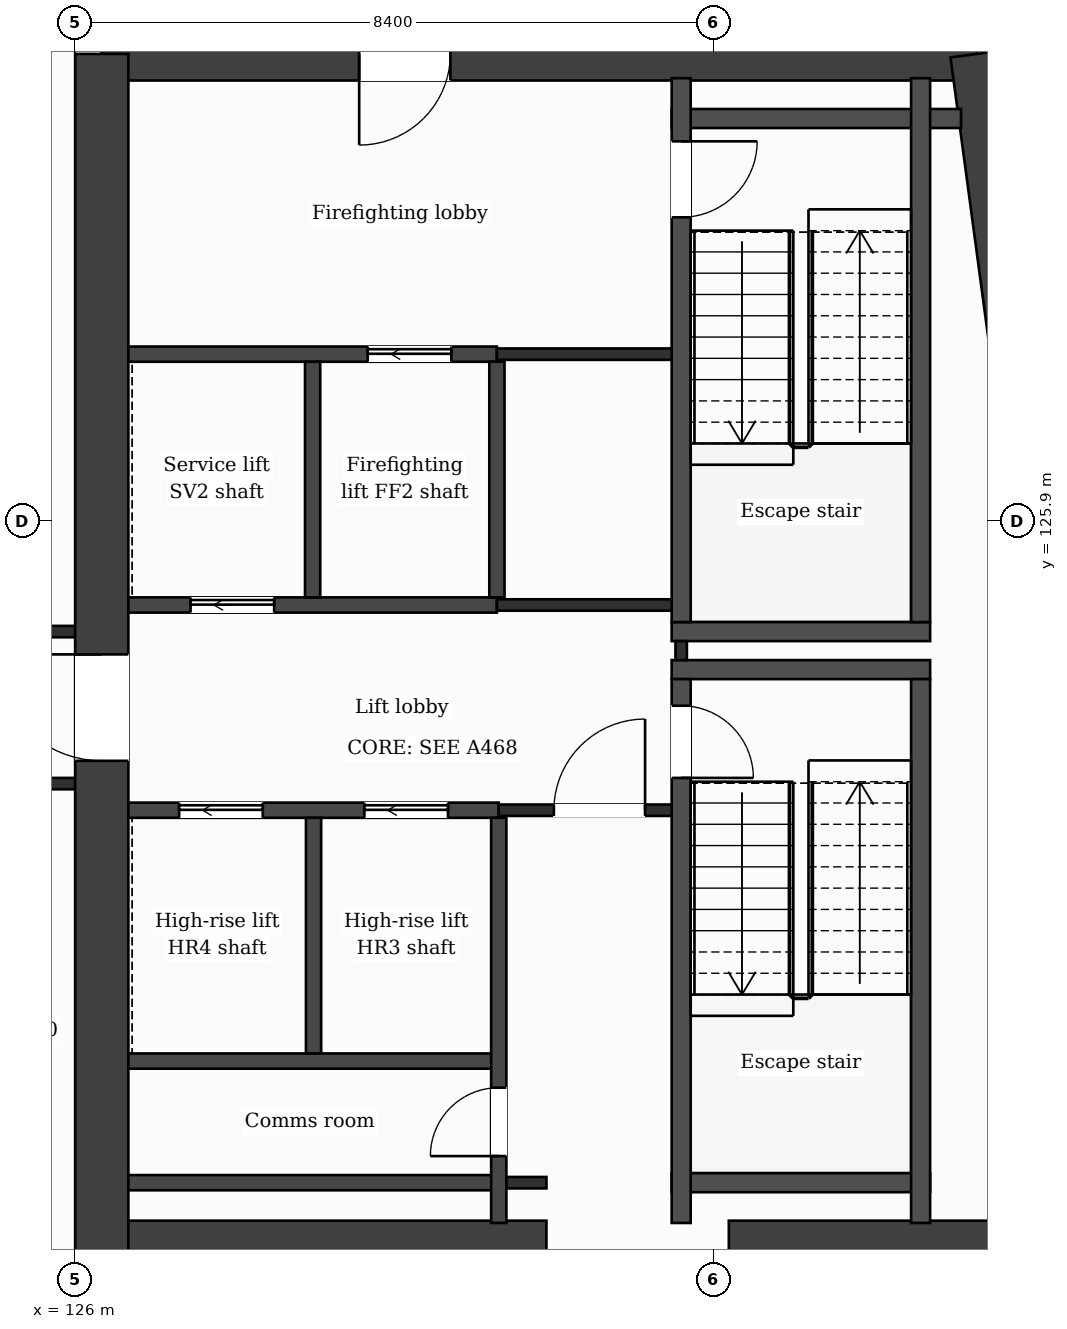
"""IFC4 building model, lengths in metres.
Left out: names, types, materials, properties, quantities, classifications, styles, units other than length and angle.
Written with IfcOpenShell. Run it as: python <this file> out.ifc"""

import sys

from ifc_helpers import new_model, si_unit, direction, frame, frame_2d, origin, place, context, subcontext, project, spatial, rectangle, extrude, element, fill, save


model = new_model("IFC4")
c1 = context("Model", 3, precision=1e-05, world=origin(), true_north=direction((0.0, 1.0)))
c2 = subcontext(c1, "Body", "Model", "MODEL_VIEW")
j1 = project(units=[si_unit("LENGTHUNIT", "METRE"), si_unit("PLANEANGLEUNIT", "RADIAN")], contexts=[c1])
p1 = place(None, origin())
s1 = spatial("IfcSite", under=j1, at=p1, CompositionType="ELEMENT")
p2 = place(p1, origin())
s2 = spatial("IfcBuilding", under=s1, at=p2, CompositionType="ELEMENT")
p3 = place(p2, frame((0.0, 0.0, 277.5)))
s3 = spatial("IfcBuildingStorey", under=s2, at=p3, CompositionType="ELEMENT", Elevation=277.5)
p4 = place(p3, frame((126.35, 132.05, 0.0), z_axis=(0.0, 0.0, 1.0), x_axis=(1.0, 0.0, 0.0)))
e1 = element("IfcWall", 1, at=p4, inside=s3, PredefinedType="SHEAR", context=c2, shape_type="SweptSolid", body=[
    extrude(rectangle(XDim=11.513, YDim=0.7, at=frame_2d((5.757, 0.0))), origin(), (0.0, 0.0, 1.0), 3.7),
])
p5 = place(p4, frame((3.386, 0.0, 0.0)))
e2 = element("IfcOpeningElement", 2, at=p5, cuts=e1, PredefinedType="OPENING", context=c2, shape_type="SweptSolid", body=[
    extrude(rectangle(XDim=1.2, YDim=2.1, at=frame_2d((0.6, 1.05))), frame((0.0, 0.36, 0.0), z_axis=(0.0, -1.0, 0.0), x_axis=(1.0, 0.0, 0.0)), (0.0, 0.0, 1.0), 0.72),
])
p6 = place(p3, frame((137.863, 132.05, 0.0), z_axis=(0.0, 0.0, 1.0), x_axis=(0.133406218907, -0.991061441464, 0.0)))
e3 = element("IfcWall", 3, at=p6, inside=s3, PredefinedType="SHEAR", context=c2, shape_type="SweptSolid", body=[
    extrude(rectangle(XDim=21.492, YDim=0.7, at=frame_2d((10.746, 0.0))), origin(), (0.0, 0.0, 1.0), 3.7),
])
p7 = place(p3, frame((126.35, 110.75, 0.0), z_axis=(0.0, 0.0, 1.0), x_axis=(0.0, 1.0, 0.0)))
e4 = element("IfcWall", 4, at=p7, inside=s3, PredefinedType="SHEAR", context=c2, shape_type="SweptSolid", body=[
    extrude(rectangle(XDim=21.3, YDim=0.7, at=frame_2d((10.65, 0.0))), origin(), (0.0, 0.0, 1.0), 3.7),
])
p8 = place(p7, frame((12.0, 0.0, 0.0)))
e5 = element("IfcOpeningElement", 5, at=p8, cuts=e4, PredefinedType="OPENING", context=c2, shape_type="SweptSolid", body=[
    extrude(rectangle(XDim=1.4, YDim=2.1, at=frame_2d((0.7, 1.05))), frame((0.0, 0.36, 0.0), z_axis=(0.0, -1.0, 0.0), x_axis=(1.0, 0.0, 0.0)), (0.0, 0.0, 1.0), 0.72),
])
p9 = place(p3, frame((126.7, 116.35, 0.0), z_axis=(0.0, 0.0, 1.0), x_axis=(1.0, 0.0, 0.0)))
e6 = element("IfcWall", 6, at=p9, inside=s3, PredefinedType="SHEAR", context=c2, shape_type="SweptSolid", body=[
    extrude(rectangle(XDim=5.5, YDim=0.7, at=frame_2d((2.75, 0.0))), origin(), (0.0, 0.0, 1.0), 3.7),
])
p10 = place(p3, frame((134.6, 116.35, 0.0), z_axis=(0.0, 0.0, 1.0), x_axis=(1.0, 0.0, 0.0)))
e7 = element("IfcWall", 7, at=p10, inside=s3, PredefinedType="SHEAR", context=c2, shape_type="SweptSolid", body=[
    extrude(rectangle(XDim=5.077, YDim=0.7, at=frame_2d((2.539, 0.0))), origin(), (0.0, 0.0, 1.0), 3.7),
])
p11 = place(p3, frame((126.7, 117.2, 0.0), z_axis=(0.0, 0.0, 1.0), x_axis=(1.0, 0.0, 0.0)))
e8 = element("IfcWall", 8, at=p11, inside=s3, PredefinedType="PARTITIONING", context=c2, shape_type="SweptSolid", body=[
    extrude(rectangle(XDim=4.873, YDim=0.2, at=frame_2d((2.437, 0.0))), origin(), (0.0, 0.0, 1.0), 3.38),
])
p12 = place(p3, frame((131.573, 117.2, 0.0), z_axis=(0.0, 0.0, 1.0), x_axis=(1.0, 0.0, 0.0)))
e9 = element("IfcWall", 9, at=p12, inside=s3, PredefinedType="PARTITIONING", context=c2, shape_type="SweptSolid", body=[
    extrude(rectangle(XDim=0.627, YDim=0.15, at=frame_2d((0.313, 0.0))), origin(), (0.0, 0.0, 1.0), 3.38),
])
p13 = place(p3, frame((133.848, 117.2, 0.0), z_axis=(0.0, 0.0, 1.0), x_axis=(1.0, 0.0, 0.0)))
e10 = element("IfcWall", 10, at=p13, inside=s3, PredefinedType="PARTITIONING", context=c2, shape_type="SweptSolid", body=[
    extrude(rectangle(XDim=3.4, YDim=0.25, at=frame_2d((1.7, 0.0))), origin(), (0.0, 0.0, 1.0), 3.38),
])
p14 = place(p3, frame((126.7, 118.8, 0.0), z_axis=(0.0, 0.0, 1.0), x_axis=(1.0, 0.0, 0.0)))
e11 = element("IfcWall", 11, at=p14, inside=s3, PredefinedType="PARTITIONING", context=c2, shape_type="SweptSolid", body=[
    extrude(rectangle(XDim=4.873, YDim=0.2, at=frame_2d((2.437, 0.0))), origin(), (0.0, 0.0, 1.0), 3.38),
])
p15 = place(p3, frame((126.7, 122.1, 0.0), z_axis=(0.0, 0.0, 1.0), x_axis=(1.0, 0.0, 0.0)))
e12 = element("IfcWall", 12, at=p15, inside=s3, PredefinedType="PARTITIONING", context=c2, shape_type="SweptSolid", body=[
    extrude(rectangle(XDim=4.873, YDim=0.2, at=frame_2d((2.437, 0.0))), origin(), (0.0, 0.0, 1.0), 3.38),
])
p16 = place(p15, frame((3.105, 0.0, 0.0)))
e13 = element("IfcOpeningElement", 13, at=p16, cuts=e12, PredefinedType="OPENING", context=c2, shape_type="SweptSolid", body=[
    extrude(rectangle(XDim=1.1, YDim=2.1, at=frame_2d((0.55, 1.05))), frame((0.0, 0.11, 0.0), z_axis=(0.0, -1.0, 0.0), x_axis=(1.0, 0.0, 0.0)), (0.0, 0.0, 1.0), 0.22),
])
p17 = place(p15, frame((0.668, 0.0, 0.0)))
e14 = element("IfcOpeningElement", 14, at=p17, cuts=e12, PredefinedType="OPENING", context=c2, shape_type="SweptSolid", body=[
    extrude(rectangle(XDim=1.1, YDim=2.1, at=frame_2d((0.55, 1.05))), frame((0.0, 0.11, 0.0), z_axis=(0.0, -1.0, 0.0), x_axis=(1.0, 0.0, 0.0)), (0.0, 0.0, 1.0), 0.22),
])
p18 = place(p3, frame((131.573, 122.1, 0.0), z_axis=(0.0, 0.0, 1.0), x_axis=(1.0, 0.0, 0.0)))
e15 = element("IfcWall", 15, at=p18, inside=s3, PredefinedType="PARTITIONING", context=c2, shape_type="SweptSolid", body=[
    extrude(rectangle(XDim=2.4, YDim=0.15, at=frame_2d((1.2, 0.0))), origin(), (0.0, 0.0, 1.0), 3.38),
])
p19 = place(p18, frame((0.725, 0.0, 0.0)))
e16 = element("IfcOpeningElement", 16, at=p19, cuts=e15, PredefinedType="OPENING", context=c2, shape_type="SweptSolid", body=[
    extrude(rectangle(XDim=1.2, YDim=2.1, at=frame_2d((0.6, 1.05))), frame((0.0, 0.085, 0.0), z_axis=(0.0, -1.0, 0.0), x_axis=(1.0, 0.0, 0.0)), (0.0, 0.0, 1.0), 0.17),
])
p20 = place(p3, frame((100.8, 122.45, 0.0), z_axis=(0.0, 0.0, 1.0), x_axis=(1.0, 0.0, 0.0)))
e17 = element("IfcWall", 17, at=p20, inside=s3, PredefinedType="PARTITIONING", context=c2, shape_type="SweptSolid", body=[
    extrude(rectangle(XDim=25.2, YDim=0.15, at=frame_2d((12.6, 0.0))), origin(), (0.0, 0.0, 1.0), 3.38),
])
p21 = place(p20, frame((5.55, 0.0, 0.0)))
e18 = element("IfcOpeningElement", 18, at=p21, cuts=e17, PredefinedType="OPENING", context=c2, shape_type="SweptSolid", body=[
    extrude(rectangle(XDim=1.0, YDim=2.1, at=frame_2d((0.5, 1.05))), frame((0.0, 0.085, 0.0), z_axis=(0.0, -1.0, 0.0), x_axis=(1.0, 0.0, 0.0)), (0.0, 0.0, 1.0), 0.17),
])
p22 = place(p20, frame((8.862, 0.0, 0.0)))
e19 = element("IfcOpeningElement", 19, at=p22, cuts=e17, PredefinedType="OPENING", context=c2, shape_type="SweptSolid", body=[
    extrude(rectangle(XDim=0.95, YDim=2.1, at=frame_2d((0.475, 1.05))), frame((0.0, 0.085, 0.0), z_axis=(0.0, -1.0, 0.0), x_axis=(1.0, 0.0, 0.0)), (0.0, 0.0, 1.0), 0.17),
])
p23 = place(p20, frame((15.2, 0.0, 0.0)))
e20 = element("IfcOpeningElement", 20, at=p23, cuts=e17, PredefinedType="OPENING", context=c2, shape_type="SweptSolid", body=[
    extrude(rectangle(XDim=0.95, YDim=2.1, at=frame_2d((0.475, 1.05))), frame((0.0, 0.085, 0.0), z_axis=(0.0, -1.0, 0.0), x_axis=(1.0, 0.0, 0.0)), (0.0, 0.0, 1.0), 0.17),
])
p24 = place(p20, frame((17.325, 0.0, 0.0)))
e21 = element("IfcOpeningElement", 21, at=p24, cuts=e17, PredefinedType="OPENING", context=c2, shape_type="SweptSolid", body=[
    extrude(rectangle(XDim=1.0, YDim=2.1, at=frame_2d((0.5, 1.05))), frame((0.0, 0.085, 0.0), z_axis=(0.0, -1.0, 0.0), x_axis=(1.0, 0.0, 0.0)), (0.0, 0.0, 1.0), 0.17),
])
p25 = place(p20, frame((23.862, 0.0, 0.0)))
e22 = element("IfcOpeningElement", 22, at=p25, cuts=e17, PredefinedType="OPENING", context=c2, shape_type="SweptSolid", body=[
    extrude(rectangle(XDim=0.95, YDim=2.1, at=frame_2d((0.475, 1.05))), frame((0.0, 0.085, 0.0), z_axis=(0.0, -1.0, 0.0), x_axis=(1.0, 0.0, 0.0)), (0.0, 0.0, 1.0), 0.17),
])
for number, where, z_axis, x_axis in (
    (23, (133.848, 123.95, 0.0), (0.0, 0.0, 1.0), (1.0, 0.0, 0.0)),
    (24, (133.848, 124.45, 0.0), (0.0, 0.0, 1.0), (1.0, 0.0, 0.0)),
):
    element("IfcWall", number, at=place(p3, frame(where, z_axis=z_axis, x_axis=x_axis)), inside=s3, PredefinedType="PARTITIONING", context=c2, shape_type="SweptSolid", body=[
        extrude(rectangle(XDim=3.4, YDim=0.25, at=frame_2d((1.7, 0.0))), origin(), (0.0, 0.0, 1.0), 3.38),
    ])
p26 = place(p3, frame((100.8, 124.45, 0.0), z_axis=(0.0, 0.0, 1.0), x_axis=(1.0, 0.0, 0.0)))
e25 = element("IfcWall", 25, at=p26, inside=s3, PredefinedType="PARTITIONING", context=c2, shape_type="SweptSolid", body=[
    extrude(rectangle(XDim=25.2, YDim=0.15, at=frame_2d((12.6, 0.0))), origin(), (0.0, 0.0, 1.0), 3.38),
])
p27 = place(p26, frame((6.125, 0.0, 0.0)))
e26 = element("IfcOpeningElement", 26, at=p27, cuts=e25, PredefinedType="OPENING", context=c2, shape_type="SweptSolid", body=[
    extrude(rectangle(XDim=1.0, YDim=2.1, at=frame_2d((0.5, 1.05))), frame((0.0, 0.085, 0.0), z_axis=(0.0, -1.0, 0.0), x_axis=(1.0, 0.0, 0.0)), (0.0, 0.0, 1.0), 0.17),
])
p28 = place(p26, frame((1.325, 0.0, 0.0)))
e27 = element("IfcOpeningElement", 27, at=p28, cuts=e25, PredefinedType="OPENING", context=c2, shape_type="SweptSolid", body=[
    extrude(rectangle(XDim=1.0, YDim=2.1, at=frame_2d((0.5, 1.05))), frame((0.0, 0.085, 0.0), z_axis=(0.0, -1.0, 0.0), x_axis=(1.0, 0.0, 0.0)), (0.0, 0.0, 1.0), 0.17),
])
p29 = place(p26, frame((11.43, 0.0, 0.0)))
e28 = element("IfcOpeningElement", 28, at=p29, cuts=e25, PredefinedType="OPENING", context=c2, shape_type="SweptSolid", body=[
    extrude(rectangle(XDim=1.0, YDim=2.1, at=frame_2d((0.5, 1.05))), frame((0.0, 0.085, 0.0), z_axis=(0.0, -1.0, 0.0), x_axis=(1.0, 0.0, 0.0)), (0.0, 0.0, 1.0), 0.17),
])
p30 = place(p26, frame((21.17, 0.0, 0.0)))
e29 = element("IfcOpeningElement", 29, at=p30, cuts=e25, PredefinedType="OPENING", context=c2, shape_type="SweptSolid", body=[
    extrude(rectangle(XDim=1.0, YDim=2.1, at=frame_2d((0.5, 1.05))), frame((0.0, 0.085, 0.0), z_axis=(0.0, -1.0, 0.0), x_axis=(1.0, 0.0, 0.0)), (0.0, 0.0, 1.0), 0.17),
])
p31 = place(p3, frame((126.7, 124.8, 0.0), z_axis=(0.0, 0.0, 1.0), x_axis=(1.0, 0.0, 0.0)))
e30 = element("IfcWall", 30, at=p31, inside=s3, PredefinedType="PARTITIONING", context=c2, shape_type="SweptSolid", body=[
    extrude(rectangle(XDim=4.849, YDim=0.2, at=frame_2d((2.424, 0.0))), origin(), (0.0, 0.0, 1.0), 3.38),
])
p32 = place(p31, frame((0.818, 0.0, 0.0)))
e31 = element("IfcOpeningElement", 31, at=p32, cuts=e30, PredefinedType="OPENING", context=c2, shape_type="SweptSolid", body=[
    extrude(rectangle(XDim=1.1, YDim=2.1, at=frame_2d((0.55, 1.05))), frame((0.0, 0.11, 0.0), z_axis=(0.0, -1.0, 0.0), x_axis=(1.0, 0.0, 0.0)), (0.0, 0.0, 1.0), 0.22),
])
p33 = place(p3, frame((131.549, 124.8, 0.0), z_axis=(0.0, 0.0, 1.0), x_axis=(1.0, 0.0, 0.0)))
e32 = element("IfcWall", 32, at=p33, inside=s3, PredefinedType="PARTITIONING", context=c2, shape_type="SweptSolid", body=[
    extrude(rectangle(XDim=2.549, YDim=0.15, at=frame_2d((1.275, 0.0))), origin(), (0.0, 0.0, 1.0), 3.38),
])
p34 = place(p3, frame((126.7, 128.1, 0.0), z_axis=(0.0, 0.0, 1.0), x_axis=(1.0, 0.0, 0.0)))
e33 = element("IfcWall", 33, at=p34, inside=s3, PredefinedType="PARTITIONING", context=c2, shape_type="SweptSolid", body=[
    extrude(rectangle(XDim=4.849, YDim=0.2, at=frame_2d((2.424, 0.0))), origin(), (0.0, 0.0, 1.0), 3.38),
])
p35 = place(p34, frame((3.149, 0.0, 0.0)))
e34 = element("IfcOpeningElement", 34, at=p35, cuts=e33, PredefinedType="OPENING", context=c2, shape_type="SweptSolid", body=[
    extrude(rectangle(XDim=1.1, YDim=2.1, at=frame_2d((0.55, 1.05))), frame((0.0, 0.11, 0.0), z_axis=(0.0, -1.0, 0.0), x_axis=(1.0, 0.0, 0.0)), (0.0, 0.0, 1.0), 0.22),
])
p36 = place(p3, frame((131.549, 128.1, 0.0), z_axis=(0.0, 0.0, 1.0), x_axis=(1.0, 0.0, 0.0)))
e35 = element("IfcWall", 35, at=p36, inside=s3, PredefinedType="PARTITIONING", context=c2, shape_type="SweptSolid", body=[
    extrude(rectangle(XDim=2.424, YDim=0.15, at=frame_2d((1.212, 0.0))), origin(), (0.0, 0.0, 1.0), 3.38),
])
p37 = place(p3, frame((133.848, 131.2, 0.0), z_axis=(0.0, 0.0, 1.0), x_axis=(1.0, 0.0, 0.0)))
e36 = element("IfcWall", 36, at=p37, inside=s3, PredefinedType="PARTITIONING", context=c2, shape_type="SweptSolid", body=[
    extrude(rectangle(XDim=3.807, YDim=0.25, at=frame_2d((1.903, 0.0))), origin(), (0.0, 0.0, 1.0), 3.38),
])
for number, where, z_axis, x_axis in (
    (37, (129.124, 124.9, 0.0), (0.0, 0.0, 1.0), (0.0, 1.0, 0.0)),
    (38, (129.136, 118.9, 0.0), (0.0, 0.0, 1.0), (0.0, 1.0, 0.0)),
    (39, (131.549, 124.9, 0.0), (0.0, 0.0, 1.0), (0.0, 1.0, 0.0)),
):
    element("IfcWall", number, at=place(p3, frame(where, z_axis=z_axis, x_axis=x_axis)), inside=s3, PredefinedType="PARTITIONING", context=c2, shape_type="SweptSolid", body=[
        extrude(rectangle(XDim=3.1, YDim=0.2, at=frame_2d((1.55, 0.0))), origin(), (0.0, 0.0, 1.0), 3.38),
    ])
p38 = place(p3, frame((131.573, 116.67, 0.0), z_axis=(0.0, 0.0, 1.0), x_axis=(0.0, 1.0, 0.0)))
e40 = element("IfcWall", 40, at=p38, inside=s3, PredefinedType="PARTITIONING", context=c2, shape_type="SweptSolid", body=[
    extrude(rectangle(XDim=5.33, YDim=0.2, at=frame_2d((2.665, 0.0))), origin(), (0.0, 0.0, 1.0), 3.38),
])
p39 = place(p38, frame((0.88, 0.0, 0.0)))
e41 = element("IfcOpeningElement", 41, at=p39, cuts=e40, PredefinedType="OPENING", context=c2, shape_type="SweptSolid", body=[
    extrude(rectangle(XDim=0.9, YDim=2.1, at=frame_2d((0.45, 1.05))), frame((0.0, 0.11, 0.0), z_axis=(0.0, -1.0, 0.0), x_axis=(1.0, 0.0, 0.0)), (0.0, 0.0, 1.0), 0.22),
])
p40 = place(p3, frame((133.973, 124.075, 0.0), z_axis=(0.0, 0.0, 1.0), x_axis=(0.0, 1.0, 0.0)))
e42 = element("IfcWall", 42, at=p40, inside=s3, PredefinedType="PARTITIONING", context=c2, shape_type="SweptSolid", body=[
    extrude(rectangle(XDim=0.25, YDim=0.15, at=frame_2d((0.125, 0.0))), origin(), (0.0, 0.0, 1.0), 3.38),
])
p41 = place(p3, frame((133.973, 116.67, 0.0), z_axis=(0.0, 0.0, 1.0), x_axis=(0.0, 1.0, 0.0)))
e43 = element("IfcWall", 43, at=p41, inside=s3, PredefinedType="PARTITIONING", context=c2, shape_type="SweptSolid", body=[
    extrude(rectangle(XDim=7.155, YDim=0.25, at=frame_2d((3.578, 0.0))), origin(), (0.0, 0.0, 1.0), 3.38),
])
p42 = place(p41, frame((5.855, 0.0, 0.0)))
e44 = element("IfcOpeningElement", 44, at=p42, cuts=e43, PredefinedType="OPENING", context=c2, shape_type="SweptSolid", body=[
    extrude(rectangle(XDim=0.95, YDim=2.1, at=frame_2d((0.475, 1.05))), frame((0.0, 0.135, 0.0), z_axis=(0.0, -1.0, 0.0), x_axis=(1.0, 0.0, 0.0)), (0.0, 0.0, 1.0), 0.27),
])
p43 = place(p3, frame((133.973, 124.575, 0.0), z_axis=(0.0, 0.0, 1.0), x_axis=(0.0, 1.0, 0.0)))
e45 = element("IfcWall", 45, at=p43, inside=s3, PredefinedType="PARTITIONING", context=c2, shape_type="SweptSolid", body=[
    extrude(rectangle(XDim=7.155, YDim=0.25, at=frame_2d((3.578, 0.0))), origin(), (0.0, 0.0, 1.0), 3.38),
])
p44 = place(p43, frame((5.325, 0.0, 0.0)))
e46 = element("IfcOpeningElement", 46, at=p44, cuts=e45, PredefinedType="OPENING", context=c2, shape_type="SweptSolid", body=[
    extrude(rectangle(XDim=1.0, YDim=2.1, at=frame_2d((0.5, 1.05))), frame((0.0, 0.135, 0.0), z_axis=(0.0, -1.0, 0.0), x_axis=(1.0, 0.0, 0.0)), (0.0, 0.0, 1.0), 0.27),
])
for number, where, z_axis, x_axis in (
    (47, (137.123, 116.67, 0.0), (0.0, 0.0, 1.0), (0.0, 1.0, 0.0)),
    (48, (137.123, 124.575, 0.0), (0.0, 0.0, 1.0), (0.0, 1.0, 0.0)),
):
    element("IfcWall", number, at=place(p3, frame(where, z_axis=z_axis, x_axis=x_axis)), inside=s3, PredefinedType="PARTITIONING", context=c2, shape_type="SweptSolid", body=[
        extrude(rectangle(XDim=7.155, YDim=0.25, at=frame_2d((3.578, 0.0))), origin(), (0.0, 0.0, 1.0), 3.38),
    ])
p45 = place(p19, origin())
e49 = element("IfcDoor", 49, at=p45, inside=s3, OperationType="SINGLE_SWING_RIGHT", PredefinedType="DOOR", context=c2, shape_type="SweptSolid", body=[
    extrude(rectangle(XDim=1.2, YDim=2.1, at=frame_2d((0.6, 1.05))), frame((0.0, 0.025, 0.0), z_axis=(0.0, -1.0, 0.0), x_axis=(1.0, 0.0, 0.0)), (0.0, 0.0, 1.0), 0.05),
])
fill(e16, e49)
p46 = place(p16, origin())
e50 = element("IfcDoor", 50, at=p46, inside=s3, OperationType="SLIDING_TO_LEFT", PredefinedType="DOOR", context=c2, shape_type="SweptSolid", body=[
    extrude(rectangle(XDim=1.1, YDim=2.1, at=frame_2d((0.55, 1.05))), frame((0.0, 0.025, 0.0), z_axis=(0.0, -1.0, 0.0), x_axis=(1.0, 0.0, 0.0)), (0.0, 0.0, 1.0), 0.05),
])
fill(e13, e50)
p47 = place(p17, origin())
e51 = element("IfcDoor", 51, at=p47, inside=s3, OperationType="SLIDING_TO_LEFT", PredefinedType="DOOR", context=c2, shape_type="SweptSolid", body=[
    extrude(rectangle(XDim=1.1, YDim=2.1, at=frame_2d((0.55, 1.05))), frame((0.0, 0.025, 0.0), z_axis=(0.0, -1.0, 0.0), x_axis=(1.0, 0.0, 0.0)), (0.0, 0.0, 1.0), 0.05),
])
fill(e14, e51)
p48 = place(p35, origin())
e52 = element("IfcDoor", 52, at=p48, inside=s3, OperationType="SLIDING_TO_LEFT", PredefinedType="DOOR", context=c2, shape_type="SweptSolid", body=[
    extrude(rectangle(XDim=1.1, YDim=2.1, at=frame_2d((0.55, 1.05))), frame((0.0, 0.025, 0.0), z_axis=(0.0, -1.0, 0.0), x_axis=(1.0, 0.0, 0.0)), (0.0, 0.0, 1.0), 0.05),
])
fill(e34, e52)
p49 = place(p32, origin())
e53 = element("IfcDoor", 53, at=p49, inside=s3, OperationType="SLIDING_TO_LEFT", PredefinedType="DOOR", context=c2, shape_type="SweptSolid", body=[
    extrude(rectangle(XDim=1.1, YDim=2.1, at=frame_2d((0.55, 1.05))), frame((0.0, 0.025, 0.0), z_axis=(0.0, -1.0, 0.0), x_axis=(1.0, 0.0, 0.0)), (0.0, 0.0, 1.0), 0.05),
])
fill(e31, e53)
p50 = place(p42, origin())
e54 = element("IfcDoor", 54, at=p50, inside=s3, OperationType="SINGLE_SWING_LEFT", PredefinedType="DOOR", context=c2, shape_type="SweptSolid", body=[
    extrude(rectangle(XDim=0.95, YDim=2.1, at=frame_2d((0.475, 1.05))), frame((0.0, 0.025, 0.0), z_axis=(0.0, -1.0, 0.0), x_axis=(1.0, 0.0, 0.0)), (0.0, 0.0, 1.0), 0.05),
])
fill(e44, e54)
p51 = place(p44, origin())
e55 = element("IfcDoor", 55, at=p51, inside=s3, OperationType="SINGLE_SWING_RIGHT", PredefinedType="DOOR", context=c2, shape_type="SweptSolid", body=[
    extrude(rectangle(XDim=1.0, YDim=2.1, at=frame_2d((0.5, 1.05))), frame((0.0, 0.025, 0.0), z_axis=(0.0, -1.0, 0.0), x_axis=(1.0, 0.0, 0.0)), (0.0, 0.0, 1.0), 0.05),
])
fill(e46, e55)
p52 = place(p39, origin())
e56 = element("IfcDoor", 56, at=p52, inside=s3, OperationType="SINGLE_SWING_LEFT", PredefinedType="DOOR", context=c2, shape_type="SweptSolid", body=[
    extrude(rectangle(XDim=0.9, YDim=2.1, at=frame_2d((0.45, 1.05))), frame((0.0, 0.025, 0.0), z_axis=(0.0, -1.0, 0.0), x_axis=(1.0, 0.0, 0.0)), (0.0, 0.0, 1.0), 0.05),
])
fill(e41, e56)
p53 = place(p5, origin())
e57 = element("IfcDoor", 57, at=p53, inside=s3, OperationType="SINGLE_SWING_LEFT", PredefinedType="DOOR", context=c2, shape_type="SweptSolid", body=[
    extrude(rectangle(XDim=1.2, YDim=2.1, at=frame_2d((0.6, 1.05))), frame((0.0, 0.025, 0.0), z_axis=(0.0, -1.0, 0.0), x_axis=(1.0, 0.0, 0.0)), (0.0, 0.0, 1.0), 0.05),
])
fill(e2, e57)
p54 = place(p8, origin())
e58 = element("IfcDoor", 58, at=p54, inside=s3, OperationType="SINGLE_SWING_RIGHT", PredefinedType="DOOR", context=c2, shape_type="SweptSolid", body=[
    extrude(rectangle(XDim=1.4, YDim=2.1, at=frame_2d((0.7, 1.05))), frame((0.0, 0.025, 0.0), z_axis=(0.0, -1.0, 0.0), x_axis=(1.0, 0.0, 0.0)), (0.0, 0.0, 1.0), 0.05),
])
fill(e5, e58)
save(model, sys.argv[1])
